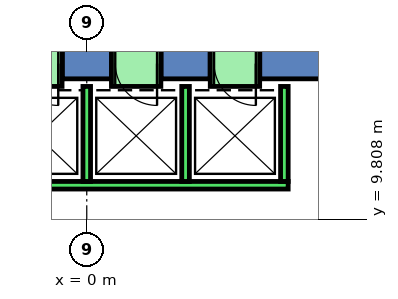
"""IFC4 building model, lengths in metres.
Left out: names, types, materials, properties, quantities, classifications, styles, units other than length and angle.
Written with IfcOpenShell. Run it as: python <this file> out.ifc"""

import sys

from ifc_helpers import new_model, si_unit, direction, frame, frame_2d, origin, place, context, subcontext, project, spatial, polyline, rectangle, outline, extrude, element, fill, save


model = new_model("IFC4")
c1 = context("Model", 3, precision=1e-05, world=origin(), true_north=direction((0.0, 1.0)))
c2 = subcontext(c1, "Body", "Model", "MODEL_VIEW")
j1 = project(units=[si_unit("LENGTHUNIT", "METRE"), si_unit("PLANEANGLEUNIT", "RADIAN")], contexts=[c1])
p1 = place(None, origin())
s1 = spatial("IfcSite", under=j1, at=p1, CompositionType="ELEMENT")
p2 = place(p1, origin())
s2 = spatial("IfcBuilding", under=s1, at=p2, CompositionType="ELEMENT")
p3 = place(p2, origin())
s3 = spatial("IfcBuildingStorey", under=s2, at=p3, CompositionType="ELEMENT", Elevation=0.0)
p4 = place(p3, frame((0.0, 0.0, -0.5)))
e1 = element("IfcWall", 1, at=p4, inside=s3, PredefinedType="SHEAR", context=c2, shape_type="SweptSolid", body=[
    extrude(outline(polyline([(4.55, 14.5), (4.55, 13.5), (6.351, 13.5), (6.928, 14.5), (4.55, 14.5)])), origin(), (0.0, 0.0, 1.0), 9.05),
])
p5 = place(p3, frame((0.0, 0.0, -0.5)))
e2 = element("IfcWall", 2, at=p5, inside=s3, PredefinedType="SHEAR", context=c2, shape_type="SweptSolid", body=[
    extrude(outline(polyline([(1.95, 14.5), (1.95, 13.5), (3.25, 13.5), (3.25, 14.5), (1.95, 14.5)])), origin(), (0.0, 0.0, 1.0), 9.05),
])
p6 = place(p3, frame((0.0, 0.0, -0.5)))
e3 = element("IfcWall", 3, at=p6, inside=s3, PredefinedType="SHEAR", context=c2, shape_type="SweptSolid", body=[
    extrude(outline(polyline([(-0.65, 14.5), (-0.65, 13.5), (0.65, 13.5), (0.65, 14.5), (-0.65, 14.5)])), origin(), (0.0, 0.0, 1.0), 9.05),
])
p7 = place(p3, frame((0.0, 0.0, 3.6)))
e4 = element("IfcWall", 4, at=p7, inside=s3, PredefinedType="SHEAR", context=c2, shape_type="SweptSolid", body=[
    extrude(outline(polyline([(3.25, 14.5), (3.25, 13.5), (4.55, 13.5), (4.55, 14.5), (3.25, 14.5)])), origin(), (0.0, 0.0, 1.0), 4.95),
])
p8 = place(p3, frame((0.0, 0.0, 3.6)))
e5 = element("IfcWall", 5, at=p8, inside=s3, PredefinedType="SHEAR", context=c2, shape_type="SweptSolid", body=[
    extrude(outline(polyline([(0.65, 14.5), (0.65, 13.5), (1.95, 13.5), (1.95, 14.5), (0.65, 14.5)])), origin(), (0.0, 0.0, 1.0), 4.95),
])
p9 = place(p3, frame((0.0, 0.0, 3.6)))
e6 = element("IfcWall", 6, at=p9, inside=s3, PredefinedType="SHEAR", context=c2, shape_type="SweptSolid", body=[
    extrude(outline(polyline([(-1.95, 14.5), (-1.95, 13.5), (-0.65, 13.5), (-0.65, 14.5), (-1.95, 14.5)])), origin(), (0.0, 0.0, 1.0), 4.95),
])
p10 = place(p3, frame((5.3, 10.7, 0.0), z_axis=(0.0, 0.0, 1.0), x_axis=(-1.0, 0.0, 0.0)))
e7 = element("IfcWall", 7, at=p10, inside=s3, PredefinedType="STANDARD", context=c2, shape_type="SweptSolid", body=[
    extrude(rectangle(XDim=10.6, YDim=0.2, at=frame_2d((5.3, 0.0))), origin(), (0.0, 0.0, 1.0), 8.55),
])
for number, where, z_axis, x_axis in (
    (8, (5.2, 10.8, 0.0), (0.0, 0.0, 1.0), (0.0, 1.0, 0.0)),
    (9, (2.6, 10.8, 0.0), (0.0, 0.0, 1.0), (0.0, 1.0, 0.0)),
    (10, (0.0, 10.8, 0.0), (0.0, 0.0, 1.0), (0.0, 1.0, 0.0)),
):
    element("IfcWall", number, at=place(p3, frame(where, z_axis=z_axis, x_axis=x_axis)), inside=s3, PredefinedType="STANDARD", context=c2, shape_type="SweptSolid", body=[
        extrude(rectangle(XDim=2.5, YDim=0.2, at=frame_2d((1.25, 0.0))), origin(), (0.0, 0.0, 1.0), 8.55),
    ])
p11 = place(p3, frame((4.55, 13.9, 0.0), z_axis=(0.0, 0.0, 1.0), x_axis=(-1.0, 0.0, 0.0)))
e11 = element("IfcWall", 11, at=p11, inside=s3, PredefinedType="STANDARD", context=c2, shape_type="SweptSolid", body=[
    extrude(rectangle(XDim=1.3, YDim=1.2, at=frame_2d((0.65, 0.0))), origin(), (0.0, 0.0, 1.0), 2.4),
])
p12 = place(p11, frame((0.1, 0.0, 0.0)))
e12 = element("IfcOpeningElement", 12, at=p12, cuts=e11, PredefinedType="OPENING", context=c2, shape_type="SweptSolid", body=[
    extrude(rectangle(XDim=1.1, YDim=2.3, at=frame_2d((0.55, 1.15))), frame((0.0, 0.61, 0.0), z_axis=(0.0, -1.0, 0.0), x_axis=(1.0, 0.0, 0.0)), (0.0, 0.0, 1.0), 1.22),
])
p13 = place(p3, frame((1.95, 13.9, 0.0), z_axis=(0.0, 0.0, 1.0), x_axis=(-1.0, 0.0, 0.0)))
e13 = element("IfcWall", 13, at=p13, inside=s3, PredefinedType="STANDARD", context=c2, shape_type="SweptSolid", body=[
    extrude(rectangle(XDim=1.3, YDim=1.2, at=frame_2d((0.65, 0.0))), origin(), (0.0, 0.0, 1.0), 2.4),
])
p14 = place(p13, frame((0.1, 0.0, 0.0)))
e14 = element("IfcOpeningElement", 14, at=p14, cuts=e13, PredefinedType="OPENING", context=c2, shape_type="SweptSolid", body=[
    extrude(rectangle(XDim=1.1, YDim=2.3, at=frame_2d((0.55, 1.15))), frame((0.0, 0.61, 0.0), z_axis=(0.0, -1.0, 0.0), x_axis=(1.0, 0.0, 0.0)), (0.0, 0.0, 1.0), 1.22),
])
p15 = place(p3, frame((-0.65, 13.9, 0.0), z_axis=(0.0, 0.0, 1.0), x_axis=(-1.0, 0.0, 0.0)))
e15 = element("IfcWall", 15, at=p15, inside=s3, PredefinedType="STANDARD", context=c2, shape_type="SweptSolid", body=[
    extrude(rectangle(XDim=1.3, YDim=1.2, at=frame_2d((0.65, 0.0))), origin(), (0.0, 0.0, 1.0), 2.4),
])
p16 = place(p15, frame((0.1, 0.0, 0.0)))
e16 = element("IfcOpeningElement", 16, at=p16, cuts=e15, PredefinedType="OPENING", context=c2, shape_type="SweptSolid", body=[
    extrude(rectangle(XDim=1.1, YDim=2.3, at=frame_2d((0.55, 1.15))), frame((0.0, 0.61, 0.0), z_axis=(0.0, -1.0, 0.0), x_axis=(1.0, 0.0, 0.0)), (0.0, 0.0, 1.0), 1.22),
])
p17 = place(p12, origin())
e17 = element("IfcDoor", 17, at=p17, inside=s3, OperationType="SLIDING_TO_LEFT", PredefinedType="DOOR", context=c2, shape_type="SweptSolid", body=[
    extrude(rectangle(XDim=1.1, YDim=2.3, at=frame_2d((0.55, 1.15))), frame((0.0, 0.025, 0.0), z_axis=(0.0, -1.0, 0.0), x_axis=(1.0, 0.0, 0.0)), (0.0, 0.0, 1.0), 0.05),
])
fill(e12, e17)
p18 = place(p14, origin())
e18 = element("IfcDoor", 18, at=p18, inside=s3, OperationType="SLIDING_TO_LEFT", PredefinedType="DOOR", context=c2, shape_type="SweptSolid", body=[
    extrude(rectangle(XDim=1.1, YDim=2.3, at=frame_2d((0.55, 1.15))), frame((0.0, 0.025, 0.0), z_axis=(0.0, -1.0, 0.0), x_axis=(1.0, 0.0, 0.0)), (0.0, 0.0, 1.0), 0.05),
])
fill(e14, e18)
p19 = place(p16, origin())
e19 = element("IfcDoor", 19, at=p19, inside=s3, OperationType="SLIDING_TO_LEFT", PredefinedType="DOOR", context=c2, shape_type="SweptSolid", body=[
    extrude(rectangle(XDim=1.1, YDim=2.3, at=frame_2d((0.55, 1.15))), frame((0.0, 0.025, 0.0), z_axis=(0.0, -1.0, 0.0), x_axis=(1.0, 0.0, 0.0)), (0.0, 0.0, 1.0), 0.05),
])
fill(e16, e19)
save(model, sys.argv[1])
